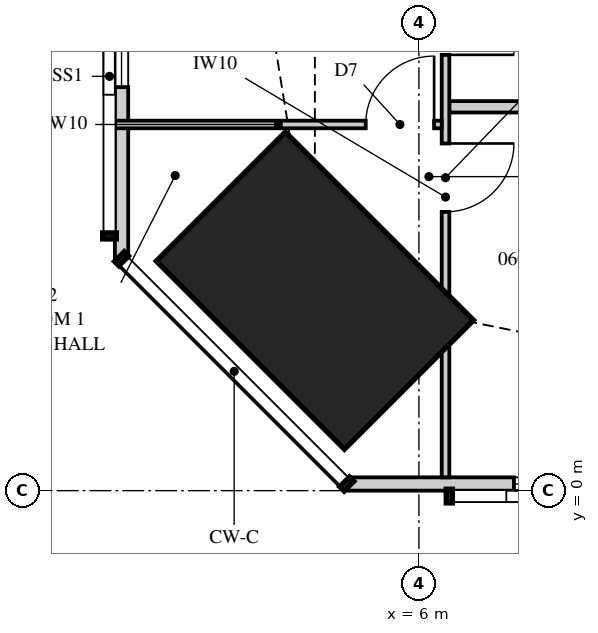
"""IFC4 building model, lengths in metres.
Left out: names, types, materials, properties, quantities, classifications, styles, units other than length and angle.
Written with IfcOpenShell. Run it as: python <this file> out.ifc"""

import sys

from ifc_helpers import new_model, si_unit, direction, frame, frame_2d, origin, origin_2d, place, context, subcontext, project, spatial, polyline, rectangle, outline, extrude, element, fill, save


model = new_model("IFC4")
c1 = context("Model", 3, precision=1e-05, world=origin(), true_north=direction((0.0, 1.0)))
c2 = subcontext(c1, "Body", "Model", "MODEL_VIEW")
j1 = project(units=[si_unit("LENGTHUNIT", "METRE"), si_unit("PLANEANGLEUNIT", "RADIAN")], contexts=[c1])
p1 = place(None, origin())
s1 = spatial("IfcSite", under=j1, at=p1, CompositionType="ELEMENT")
p2 = place(p1, origin())
s2 = spatial("IfcBuilding", under=s1, at=p2, CompositionType="ELEMENT")
p3 = place(p2, frame((0.0, 0.0, 27.7)))
s3 = spatial("IfcBuildingStorey", under=s2, at=p3, CompositionType="ELEMENT", Elevation=27.7)
p4 = place(p3, frame((4.631, 2.631, 0.0), z_axis=(0.0, 0.0, 1.0), x_axis=(0.707106781187, 0.707106781187, 0.0)))
e1 = element("IfcColumn", 1, at=p4, inside=s3, PredefinedType="COLUMN", context=c2, shape_type="SweptSolid", body=[
    extrude(rectangle(XDim=2.4, YDim=3.5, at=origin_2d()), origin(), (0.0, 0.0, 1.0), 3.35),
])
p5 = place(p3, frame((5.051, 0.087, 0.0), z_axis=(0.0, 0.0, 1.0), x_axis=(1.0, 0.0, 0.0)))
e2 = element("IfcWall", 2, at=p5, inside=s3, PredefinedType="SOLIDWALL", context=c2, shape_type="SweptSolid", body=[
    extrude(outline(polyline([(0.0, 0.0), (10.924, 0.0), (10.924, 2.15), (7.949, 2.15), (7.949, 3.11), (7.793, 3.11), (7.793, 2.15), (7.745, 2.15), (7.745, 3.11), (0.0, 3.11), (0.0, 0.0)])), frame((0.0, 0.087, 0.0), z_axis=(0.0, -1.0, 0.0), x_axis=(1.0, 0.0, 0.0)), (0.0, 0.0, 1.0), 0.175),
])
p6 = place(p5, frame((2.199, 0.0, 0.4)))
e3 = element("IfcOpeningElement", 3, at=p6, cuts=e2, PredefinedType="OPENING", context=c2, shape_type="SweptSolid", body=[
    extrude(rectangle(XDim=1.8, YDim=1.7, at=frame_2d((0.9, 0.85))), frame((0.0, 0.097, 0.0), z_axis=(0.0, -1.0, 0.0), x_axis=(1.0, 0.0, 0.0)), (0.0, 0.0, 1.0), 0.195),
])
p7 = place(p3, frame((2.087, 17.333, 0.0), z_axis=(0.0, 0.0, 1.0), x_axis=(0.0, -1.0, 0.0)))
e4 = element("IfcWall", 4, at=p7, inside=s3, PredefinedType="SOLIDWALL", context=c2, shape_type="SweptSolid", body=[
    extrude(outline(polyline([(0.0, 0.0), (14.282, 0.0), (14.282, 3.11), (4.552, 3.11), (4.552, 2.15), (4.459, 2.15), (4.459, 3.11), (4.333, 3.11), (4.333, 2.15), (0.0, 2.15), (0.0, 0.0)])), frame((0.0, 0.087, 0.0), z_axis=(0.0, -1.0, 0.0), x_axis=(1.0, 0.0, 0.0)), (0.0, 0.0, 1.0), 0.175),
])
p8 = place(p7, frame((0.3, 0.0, 0.4)))
e5 = element("IfcOpeningElement", 5, at=p8, cuts=e4, PredefinedType="OPENING", context=c2, shape_type="SweptSolid", body=[
    extrude(rectangle(XDim=1.2, YDim=1.7, at=frame_2d((0.6, 0.85))), frame((0.0, 0.097, 0.0), z_axis=(0.0, -1.0, 0.0), x_axis=(1.0, 0.0, 0.0)), (0.0, 0.0, 1.0), 0.195),
])
p9 = place(p7, frame((7.158, 0.0, 0.4)))
e6 = element("IfcOpeningElement", 6, at=p9, cuts=e4, PredefinedType="OPENING", context=c2, shape_type="SweptSolid", body=[
    extrude(rectangle(XDim=1.8, YDim=1.7, at=frame_2d((0.9, 0.85))), frame((0.0, 0.097, 0.0), z_axis=(0.0, -1.0, 0.0), x_axis=(1.0, 0.0, 0.0)), (0.0, 0.0, 1.0), 0.195),
])
p10 = place(p7, frame((10.225, 0.0, 0.4)))
e7 = element("IfcOpeningElement", 7, at=p10, cuts=e4, PredefinedType="OPENING", context=c2, shape_type="SweptSolid", body=[
    extrude(rectangle(XDim=1.8, YDim=1.7, at=frame_2d((0.9, 0.85))), frame((0.0, 0.097, 0.0), z_axis=(0.0, -1.0, 0.0), x_axis=(1.0, 0.0, 0.0)), (0.0, 0.0, 1.0), 0.195),
])
p11 = place(p3, frame((6.35, 0.175, 0.0), z_axis=(0.0, 0.0, 1.0), x_axis=(0.0, 1.0, 0.0)))
e8 = element("IfcWall", 8, at=p11, inside=s3, PredefinedType="PARTITIONING", context=c2, shape_type="SweptSolid", body=[
    extrude(outline(polyline([(0.0, 0.0), (7.375, 0.0), (7.375, 3.11), (2.988, 3.11), (2.988, 2.15), (1.234, 2.15), (1.234, 3.11), (0.0, 3.11), (0.0, 0.0)])), frame((0.0, 0.05, 0.0), z_axis=(0.0, -1.0, 0.0), x_axis=(1.0, 0.0, 0.0)), (0.0, 0.0, 1.0), 0.1),
])
p12 = place(p11, frame((3.492, 0.0, 0.0)))
e9 = element("IfcOpeningElement", 9, at=p12, cuts=e8, PredefinedType="OPENING", context=c2, shape_type="SweptSolid", body=[
    extrude(rectangle(XDim=0.9, YDim=2.1, at=frame_2d((0.45, 1.05))), frame((0.0, 0.06, 0.0), z_axis=(0.0, -1.0, 0.0), x_axis=(1.0, 0.0, 0.0)), (0.0, 0.0, 1.0), 0.12),
])
p13 = place(p11, frame((5.559, 0.0, 0.0)))
e10 = element("IfcOpeningElement", 10, at=p13, cuts=e8, PredefinedType="OPENING", context=c2, shape_type="SweptSolid", body=[
    extrude(rectangle(XDim=0.9, YDim=2.1, at=frame_2d((0.45, 1.05))), frame((0.0, 0.06, 0.0), z_axis=(0.0, -1.0, 0.0), x_axis=(1.0, 0.0, 0.0)), (0.0, 0.0, 1.0), 0.12),
])
p14 = place(p3, frame((2.0, 4.817, 0.0), z_axis=(0.0, 0.0, 1.0), x_axis=(1.0, 0.0, 0.0)))
e11 = element("IfcWall", 11, at=p14, inside=s3, PredefinedType="PARTITIONING", context=c2, shape_type="SweptSolid", body=[
    extrude(outline(polyline([(0.0, 0.0), (4.3, 0.0), (4.3, 3.11), (3.148, 3.11), (3.148, 2.15), (1.406, 2.15), (1.406, 3.11), (0.0, 3.11), (0.0, 0.0)])), frame((0.0, 0.05, 0.0), z_axis=(0.0, -1.0, 0.0), x_axis=(1.0, 0.0, 0.0)), (0.0, 0.0, 1.0), 0.1),
])
p15 = place(p14, frame((3.3, 0.0, 0.0)))
e12 = element("IfcOpeningElement", 12, at=p15, cuts=e11, PredefinedType="OPENING", context=c2, shape_type="SweptSolid", body=[
    extrude(rectangle(XDim=0.9, YDim=2.1, at=frame_2d((0.45, 1.05))), frame((0.0, 0.06, 0.0), z_axis=(0.0, -1.0, 0.0), x_axis=(1.0, 0.0, 0.0)), (0.0, 0.0, 1.0), 0.12),
])
p16 = place(p3, frame((6.4, 5.05, 0.0), z_axis=(0.0, 0.0, 1.0), x_axis=(1.0, 0.0, 0.0)))
e13 = element("IfcWall", 13, at=p16, inside=s3, PredefinedType="PLUMBINGWALL", context=c2, shape_type="SweptSolid", body=[
    extrude(outline(polyline([(0.0, 0.0), (3.5, 0.0), (3.5, 3.11), (3.5, 2.51), (2.515, 2.51), (2.515, 3.11), (0.0, 3.11), (0.0, 0.0)])), frame((0.0, 0.075, 0.0), z_axis=(0.0, -1.0, 0.0), x_axis=(1.0, 0.0, 0.0)), (0.0, 0.0, 1.0), 0.15),
])
p17 = place(p6, origin())
e14 = element("IfcWindow", 14, at=p17, inside=s3, PartitioningType="SINGLE_PANEL", PredefinedType="WINDOW", context=c2, shape_type="SweptSolid", body=[
    extrude(rectangle(XDim=1.8, YDim=1.7, at=frame_2d((0.9, 0.85))), frame((0.0, 0.03, 0.0), z_axis=(0.0, -1.0, 0.0), x_axis=(1.0, 0.0, 0.0)), (0.0, 0.0, 1.0), 0.06),
])
fill(e3, e14)
p18 = place(p10, origin())
e15 = element("IfcWindow", 15, at=p18, inside=s3, PartitioningType="SINGLE_PANEL", PredefinedType="WINDOW", context=c2, shape_type="SweptSolid", body=[
    extrude(rectangle(XDim=1.8, YDim=1.7, at=frame_2d((0.9, 0.85))), frame((0.0, 0.03, 0.0), z_axis=(0.0, -1.0, 0.0), x_axis=(1.0, 0.0, 0.0)), (0.0, 0.0, 1.0), 0.06),
])
fill(e7, e15)
p19 = place(p15, origin())
e16 = element("IfcDoor", 16, at=p19, inside=s3, OperationType="SINGLE_SWING_RIGHT", PredefinedType="DOOR", context=c2, shape_type="SweptSolid", body=[
    extrude(rectangle(XDim=0.9, YDim=2.1, at=frame_2d((0.45, 1.05))), frame((0.0, 0.025, 0.0), z_axis=(0.0, -1.0, 0.0), x_axis=(1.0, 0.0, 0.0)), (0.0, 0.0, 1.0), 0.05),
])
fill(e12, e16)
p20 = place(p12, frame((0.9, 0.0, 0.0), z_axis=(0.0, 0.0, 1.0), x_axis=(-1.0, 0.0, 0.0)))
e17 = element("IfcDoor", 17, at=p20, inside=s3, OperationType="SINGLE_SWING_LEFT", PredefinedType="DOOR", context=c2, shape_type="SweptSolid", body=[
    extrude(rectangle(XDim=0.9, YDim=2.1, at=frame_2d((0.45, 1.05))), frame((0.0, 0.025, 0.0), z_axis=(0.0, -1.0, 0.0), x_axis=(1.0, 0.0, 0.0)), (0.0, 0.0, 1.0), 0.05),
])
fill(e9, e17)
p21 = place(p13, frame((0.9, 0.0, 0.0), z_axis=(0.0, 0.0, 1.0), x_axis=(-1.0, 0.0, 0.0)))
e18 = element("IfcDoor", 18, at=p21, inside=s3, OperationType="SINGLE_SWING_RIGHT", PredefinedType="DOOR", context=c2, shape_type="SweptSolid", body=[
    extrude(rectangle(XDim=0.9, YDim=2.1, at=frame_2d((0.45, 1.05))), frame((0.0, 0.025, 0.0), z_axis=(0.0, -1.0, 0.0), x_axis=(1.0, 0.0, 0.0)), (0.0, 0.0, 1.0), 0.05),
])
fill(e10, e18)
save(model, sys.argv[1])
